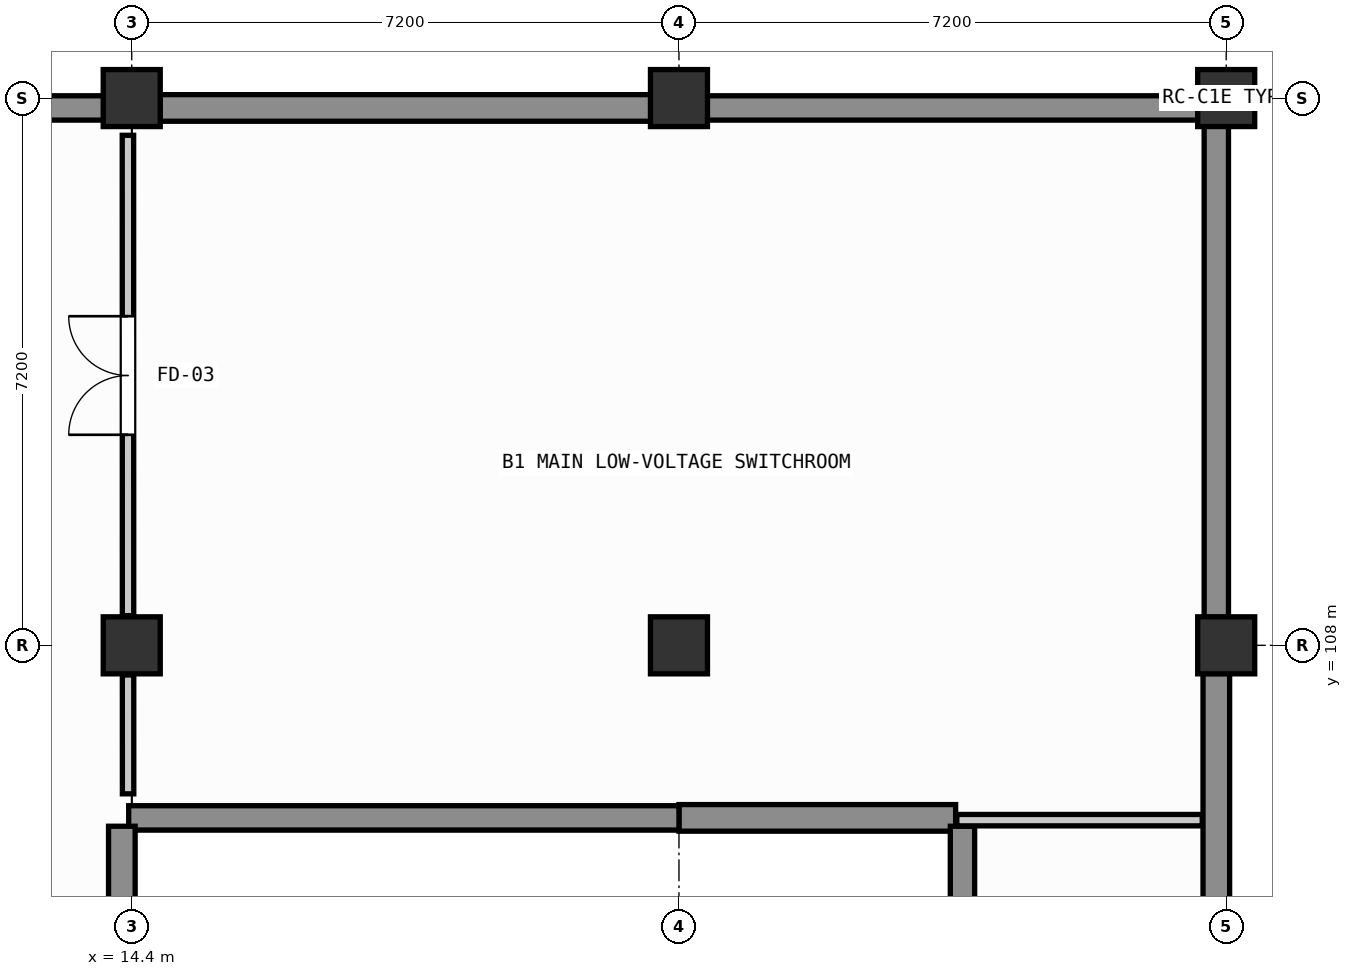
"""IFC4 building model, lengths in metres.
Left out: names, types, materials, properties, quantities, classifications, styles, units other than length and angle.
Written with IfcOpenShell. Run it as: python <this file> out.ifc"""

import sys

from ifc_helpers import new_model, si_unit, direction, frame, frame_2d, origin, origin_2d, place, context, subcontext, project, spatial, rectangle, extrude, element, fill, save


model = new_model("IFC4")
c1 = context("Model", 3, precision=1e-05, world=origin(), true_north=direction((0.0, 1.0)))
c2 = subcontext(c1, "Body", "Model", "MODEL_VIEW")
j1 = project(units=[si_unit("LENGTHUNIT", "METRE"), si_unit("PLANEANGLEUNIT", "RADIAN")], contexts=[c1])
p1 = place(None, origin())
s1 = spatial("IfcSite", under=j1, at=p1, CompositionType="ELEMENT")
p2 = place(p1, origin())
s2 = spatial("IfcBuilding", under=s1, at=p2, CompositionType="ELEMENT")
p3 = place(p2, frame((0.0, 0.0, -4.5)))
s3 = spatial("IfcBuildingStorey", under=s2, at=p3, CompositionType="ELEMENT", Elevation=-4.5)
for number, where, z_axis, x_axis in (
    (1, (14.4, 108.0, -0.5), (0.0, 0.0, 1.0), (1.0, 0.0, 0.0)),
    (2, (14.4, 115.2, -0.5), (0.0, 0.0, 1.0), (1.0, 0.0, 0.0)),
    (3, (21.6, 108.0, -0.5), (0.0, 0.0, 1.0), (1.0, 0.0, 0.0)),
    (4, (21.6, 115.2, -0.5), (0.0, 0.0, 1.0), (1.0, 0.0, 0.0)),
    (5, (28.8, 108.0, -0.5), (0.0, 0.0, 1.0), (1.0, 0.0, 0.0)),
    (6, (28.8, 115.2, -0.5), (0.0, 0.0, 1.0), (1.0, 0.0, 0.0)),
):
    element("IfcColumn", number, at=place(p3, frame(where, z_axis=z_axis, x_axis=x_axis)), inside=s3, PredefinedType="COLUMN", context=c2, shape_type="SweptSolid", body=[
        extrude(rectangle(XDim=0.75, YDim=0.75, at=origin_2d()), origin(), (0.0, 0.0, 1.0), 4.75),
    ])
p4 = place(p3, frame((28.67, 114.83, 0.0), z_axis=(0.0, 0.0, 1.0), x_axis=(0.0, -1.0, 0.0)))
e7 = element("IfcWall", 7, at=p4, inside=s3, PredefinedType="SOLIDWALL", context=c2, shape_type="SweptSolid", body=[
    extrude(rectangle(XDim=6.46, YDim=0.32, at=frame_2d((3.23, 0.0))), origin(), (0.0, 0.0, 1.0), 4.25),
])
p5 = place(p3, frame((28.67, 107.63, 0.0), z_axis=(0.0, 0.0, 1.0), x_axis=(0.0, -1.0, 0.0)))
e8 = element("IfcWall", 8, at=p5, inside=s3, PredefinedType="SOLIDWALL", context=c2, shape_type="SweptSolid", body=[
    extrude(rectangle(XDim=6.46, YDim=0.35, at=frame_2d((3.23, 0.0))), origin(), (0.0, 0.0, 1.0), 4.25),
])
p6 = place(p3, frame((7.57, 115.07, 0.0), z_axis=(0.0, 0.0, 1.0), x_axis=(1.0, 0.0, 0.0)))
e9 = element("IfcWall", 9, at=p6, inside=s3, PredefinedType="SOLIDWALL", context=c2, shape_type="SweptSolid", body=[
    extrude(rectangle(XDim=6.46, YDim=0.32, at=frame_2d((3.23, 0.0))), origin(), (0.0, 0.0, 1.0), 4.25),
])
p7 = place(p3, frame((14.77, 115.07, 0.0), z_axis=(0.0, 0.0, 1.0), x_axis=(1.0, 0.0, 0.0)))
e10 = element("IfcWall", 10, at=p7, inside=s3, PredefinedType="SOLIDWALL", context=c2, shape_type="SweptSolid", body=[
    extrude(rectangle(XDim=6.46, YDim=0.35, at=frame_2d((3.23, 0.0))), origin(), (0.0, 0.0, 1.0), 4.25),
])
p8 = place(p3, frame((21.97, 115.07, 0.0), z_axis=(0.0, 0.0, 1.0), x_axis=(1.0, 0.0, 0.0)))
e11 = element("IfcWall", 11, at=p8, inside=s3, PredefinedType="SOLIDWALL", context=c2, shape_type="SweptSolid", body=[
    extrude(rectangle(XDim=6.46, YDim=0.32, at=frame_2d((3.23, 0.0))), origin(), (0.0, 0.0, 1.0), 4.25),
])
p9 = place(p3, frame((25.24, 105.73, 0.0), z_axis=(0.0, 0.0, 1.0), x_axis=(-1.0, 0.0, 0.0)))
e12 = element("IfcWall", 12, at=p9, inside=s3, PredefinedType="SOLIDWALL", context=c2, shape_type="SweptSolid", body=[
    extrude(rectangle(XDim=3.64, YDim=0.35, at=frame_2d((1.82, 0.0))), origin(), (0.0, 0.0, 1.0), 4.25),
])
p10 = place(p3, frame((21.6, 105.73, 0.0), z_axis=(0.0, 0.0, 1.0), x_axis=(-1.0, 0.0, 0.0)))
e13 = element("IfcWall", 13, at=p10, inside=s3, PredefinedType="SOLIDWALL", context=c2, shape_type="SweptSolid", body=[
    extrude(rectangle(XDim=7.24, YDim=0.32, at=frame_2d((3.62, 0.0))), origin(), (0.0, 0.0, 1.0), 4.25),
])
p11 = place(p3, frame((14.27, 105.62, 0.0), z_axis=(0.0, 0.0, 1.0), x_axis=(0.0, -1.0, 0.0)))
e14 = element("IfcWall", 14, at=p11, inside=s3, PredefinedType="SOLIDWALL", context=c2, shape_type="SweptSolid", body=[
    extrude(rectangle(XDim=4.45, YDim=0.35, at=frame_2d((2.225, 0.0))), origin(), (0.0, 0.0, 1.0), 4.25),
])
p12 = place(p3, frame((25.33, 100.8, 0.0), z_axis=(0.0, 0.0, 1.0), x_axis=(0.0, 1.0, 0.0)))
e15 = element("IfcWall", 15, at=p12, inside=s3, PredefinedType="SOLIDWALL", context=c2, shape_type="SweptSolid", body=[
    extrude(rectangle(XDim=4.82, YDim=0.32, at=frame_2d((2.41, 0.0))), origin(), (0.0, 0.0, 1.0), 4.25),
])
p13 = place(p3, frame((28.485, 105.7, 0.0), z_axis=(0.0, 0.0, 1.0), x_axis=(-1.0, 0.0, 0.0)))
e16 = element("IfcWall", 16, at=p13, inside=s3, PredefinedType="PARTITIONING", context=c2, shape_type="SweptSolid", body=[
    extrude(rectangle(XDim=3.229, YDim=0.15, at=frame_2d((1.615, 0.0))), origin(), (0.0, 0.0, 1.0), 3.55),
])
p14 = place(p3, frame((14.352, 106.046, 0.0), z_axis=(0.0, 0.0, 1.0), x_axis=(-0.000312256035, 0.999999951248, 0.0)))
e17 = element("IfcWall", 17, at=p14, inside=s3, PredefinedType="PARTITIONING", context=c2, shape_type="SweptSolid", body=[
    extrude(rectangle(XDim=1.564, YDim=0.15, at=frame_2d((0.782, 0.0))), origin(), (0.0, 0.0, 1.0), 3.55),
])
p15 = place(p3, frame((14.351, 108.39, 0.0), z_axis=(0.0, 0.0, 1.0), x_axis=(-0.000193147136, 0.999999981347, 0.0)))
e18 = element("IfcWall", 18, at=p15, inside=s3, PredefinedType="PARTITIONING", context=c2, shape_type="SweptSolid", body=[
    extrude(rectangle(XDim=6.32, YDim=0.15, at=frame_2d((3.16, 0.0))), origin(), (0.0, 0.0, 1.0), 3.55),
])
p16 = place(p15, frame((2.38, 0.0, 0.0)))
e19 = element("IfcOpeningElement", 19, at=p16, cuts=e18, PredefinedType="OPENING", context=c2, shape_type="SweptSolid", body=[
    extrude(rectangle(XDim=1.56, YDim=2.22, at=frame_2d((0.78, 1.11))), frame((0.0, 0.085, 0.0), z_axis=(0.0, -1.0, 0.0), x_axis=(1.0, 0.0, 0.0)), (0.0, 0.0, 1.0), 0.17),
])
p17 = place(p16, origin())
e20 = element("IfcDoor", 20, at=p17, inside=s3, OperationType="DOUBLE_DOOR_SINGLE_SWING", PredefinedType="DOOR", context=c2, shape_type="SweptSolid", body=[
    extrude(rectangle(XDim=1.56, YDim=2.22, at=frame_2d((0.78, 1.11))), frame((0.0, 0.025, 0.0), z_axis=(0.0, -1.0, 0.0), x_axis=(1.0, 0.0, 0.0)), (0.0, 0.0, 1.0), 0.05),
])
fill(e19, e20)
save(model, sys.argv[1])
